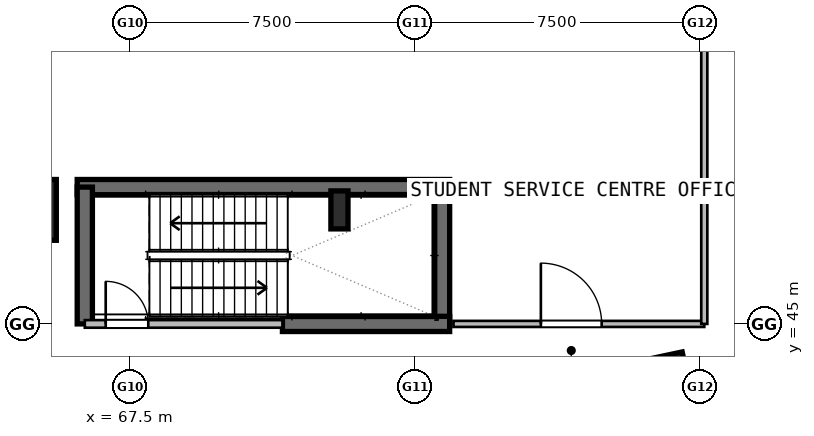
"""IFC4 building model, lengths in metres.
Left out: names, types, materials, properties, quantities, classifications, styles, units other than length and angle.
Written with IfcOpenShell. Run it as: python <this file> out.ifc"""

import sys

from ifc_helpers import new_model, si_unit, direction, frame, frame_2d, origin, origin_2d, place, context, subcontext, project, spatial, rectangle, hollow_rectangle, i_section, extrude, element, fill, save


model = new_model("IFC4")
c1 = context("Model", 3, precision=1e-05, world=origin(), true_north=direction((0.0, 1.0)))
c2 = subcontext(c1, "Body", "Model", "MODEL_VIEW")
j1 = project(units=[si_unit("LENGTHUNIT", "METRE"), si_unit("PLANEANGLEUNIT", "RADIAN")], contexts=[c1])
p1 = place(None, origin())
s1 = spatial("IfcSite", under=j1, at=p1, CompositionType="ELEMENT")
p2 = place(p1, origin())
s2 = spatial("IfcBuilding", under=s1, at=p2, CompositionType="ELEMENT")
p3 = place(p2, frame((0.0, 0.0, 6.0)))
s3 = spatial("IfcBuildingStorey", under=s2, at=p3, CompositionType="ELEMENT", Elevation=6.0)
for number, where, z_axis, x_axis in (
    (1, (64.75, 48.0, 0.0), (0.0, 0.0, 1.0), (1.0, 0.0, 0.0)),
    (2, (81.403, 43.313, 0.0), (0.0, 0.0, 1.0), (0.978, 0.208, 0.0)),
):
    element("IfcColumn", number, at=place(p3, frame(where, z_axis=z_axis, x_axis=x_axis)), inside=s3, PredefinedType="COLUMN", context=c2, shape_type="SweptSolid", body=[
        extrude(hollow_rectangle(XDim=1.6, YDim=1.6, WallThickness=0.04, at=origin_2d()), origin(), (0.0, 0.0, 1.0), 4.8),
    ])
p4 = place(p3, frame((73.0, 48.0, 0.0), z_axis=(0.0, 0.0, 1.0), x_axis=(1.0, 0.0, 0.0)))
e3 = element("IfcColumn", 3, at=p4, inside=s3, PredefinedType="COLUMN", context=c2, shape_type="SweptSolid", body=[
    extrude(i_section(OverallWidth=0.45, OverallDepth=1.0, WebThickness=0.022, FlangeThickness=0.04, at=origin_2d()), origin(), (0.0, 0.0, 1.0), 4.8),
])
p5 = place(p3, frame((66.1, 48.6, 0.0), z_axis=(0.0, 0.0, 1.0), x_axis=(1.0, 0.0, 0.0)))
e4 = element("IfcWall", 4, at=p5, inside=s3, PredefinedType="SHEAR", context=c2, shape_type="SweptSolid", body=[
    extrude(rectangle(XDim=9.8, YDim=0.4, at=frame_2d((4.9, 0.0))), origin(), (0.0, 0.0, 1.0), 4.8),
])
for number, where, z_axis, x_axis in (
    (5, (66.3, 45.0, 0.0), (0.0, 0.0, 1.0), (0.0, 1.0, 0.0)),
    (6, (75.7, 45.0, 0.0), (0.0, 0.0, 1.0), (0.0, 1.0, 0.0)),
):
    element("IfcWall", number, at=place(p3, frame(where, z_axis=z_axis, x_axis=x_axis)), inside=s3, PredefinedType="SHEAR", context=c2, shape_type="SweptSolid", body=[
        extrude(rectangle(XDim=3.6, YDim=0.4, at=frame_2d((1.8, 0.0))), origin(), (0.0, 0.0, 1.0), 4.8),
    ])
p6 = place(p3, frame((71.5, 45.0, 0.0), z_axis=(0.0, 0.0, 1.0), x_axis=(1.0, 0.0, 0.0)))
e7 = element("IfcWall", 7, at=p6, inside=s3, PredefinedType="SHEAR", context=c2, shape_type="SweptSolid", body=[
    extrude(rectangle(XDim=4.4, YDim=0.4, at=frame_2d((2.2, 0.0))), origin(), (0.0, 0.0, 1.0), 4.8),
])
p7 = place(p3, frame((66.3, 45.0, 0.0), z_axis=(0.0, 0.0, 1.0), x_axis=(1.0, 0.0, 0.0)))
e8 = element("IfcWall", 8, at=p7, inside=s3, PredefinedType="PARTITIONING", context=c2, shape_type="SweptSolid", body=[
    extrude(rectangle(XDim=5.2, YDim=0.2, at=frame_2d((2.6, 0.0))), origin(), (0.0, 0.0, 1.0), 4.48),
])
p8 = place(p7, frame((0.55, 0.0, 0.0)))
e9 = element("IfcOpeningElement", 9, at=p8, cuts=e8, PredefinedType="OPENING", context=c2, shape_type="SweptSolid", body=[
    extrude(rectangle(XDim=1.12, YDim=2.1, at=frame_2d((0.56, 1.05))), frame((0.0, 0.11, 0.0), z_axis=(0.0, -1.0, 0.0), x_axis=(1.0, 0.0, 0.0)), (0.0, 0.0, 1.0), 0.22),
])
p9 = place(p3, frame((76.0, 45.0, 0.0), z_axis=(0.0, 0.0, 1.0), x_axis=(1.0, 0.0, 0.0)))
e10 = element("IfcWall", 10, at=p9, inside=s3, PredefinedType="PARTITIONING", context=c2, shape_type="SweptSolid", body=[
    extrude(rectangle(XDim=6.6, YDim=0.16, at=frame_2d((3.3, 0.0))), origin(), (0.0, 0.0, 1.0), 4.48),
])
p10 = place(p9, frame((2.3, 0.0, 0.0)))
e11 = element("IfcOpeningElement", 11, at=p10, cuts=e10, PredefinedType="OPENING", context=c2, shape_type="SweptSolid", body=[
    extrude(rectangle(XDim=1.6, YDim=2.2, at=frame_2d((0.8, 1.1))), frame((0.0, 0.09, 0.0), z_axis=(0.0, -1.0, 0.0), x_axis=(1.0, 0.0, 0.0)), (0.0, 0.0, 1.0), 0.18),
])
p11 = place(p3, frame((82.6, 45.0, 0.0), z_axis=(0.0, 0.0, 1.0), x_axis=(0.0, 1.0, 0.0)))
e12 = element("IfcWall", 12, at=p11, inside=s3, PredefinedType="PARTITIONING", context=c2, shape_type="SweptSolid", body=[
    extrude(rectangle(XDim=7.35, YDim=0.16, at=frame_2d((3.675, 0.0))), origin(), (0.0, 0.0, 1.0), 4.48),
])
p12 = place(p8, origin())
e13 = element("IfcDoor", 13, at=p12, inside=s3, OperationType="SINGLE_SWING_LEFT", PredefinedType="DOOR", context=c2, shape_type="SweptSolid", body=[
    extrude(rectangle(XDim=1.12, YDim=2.1, at=frame_2d((0.56, 1.05))), frame((0.0, 0.025, 0.0), z_axis=(0.0, -1.0, 0.0), x_axis=(1.0, 0.0, 0.0)), (0.0, 0.0, 1.0), 0.05),
])
fill(e9, e13)
p13 = place(p10, origin())
e14 = element("IfcDoor", 14, at=p13, inside=s3, OperationType="DOUBLE_DOOR_SINGLE_SWING", PredefinedType="DOOR", context=c2, shape_type="SweptSolid", body=[
    extrude(rectangle(XDim=1.6, YDim=2.2, at=frame_2d((0.8, 1.1))), frame((0.0, 0.025, 0.0), z_axis=(0.0, -1.0, 0.0), x_axis=(1.0, 0.0, 0.0)), (0.0, 0.0, 1.0), 0.05),
])
fill(e11, e14)
save(model, sys.argv[1])
